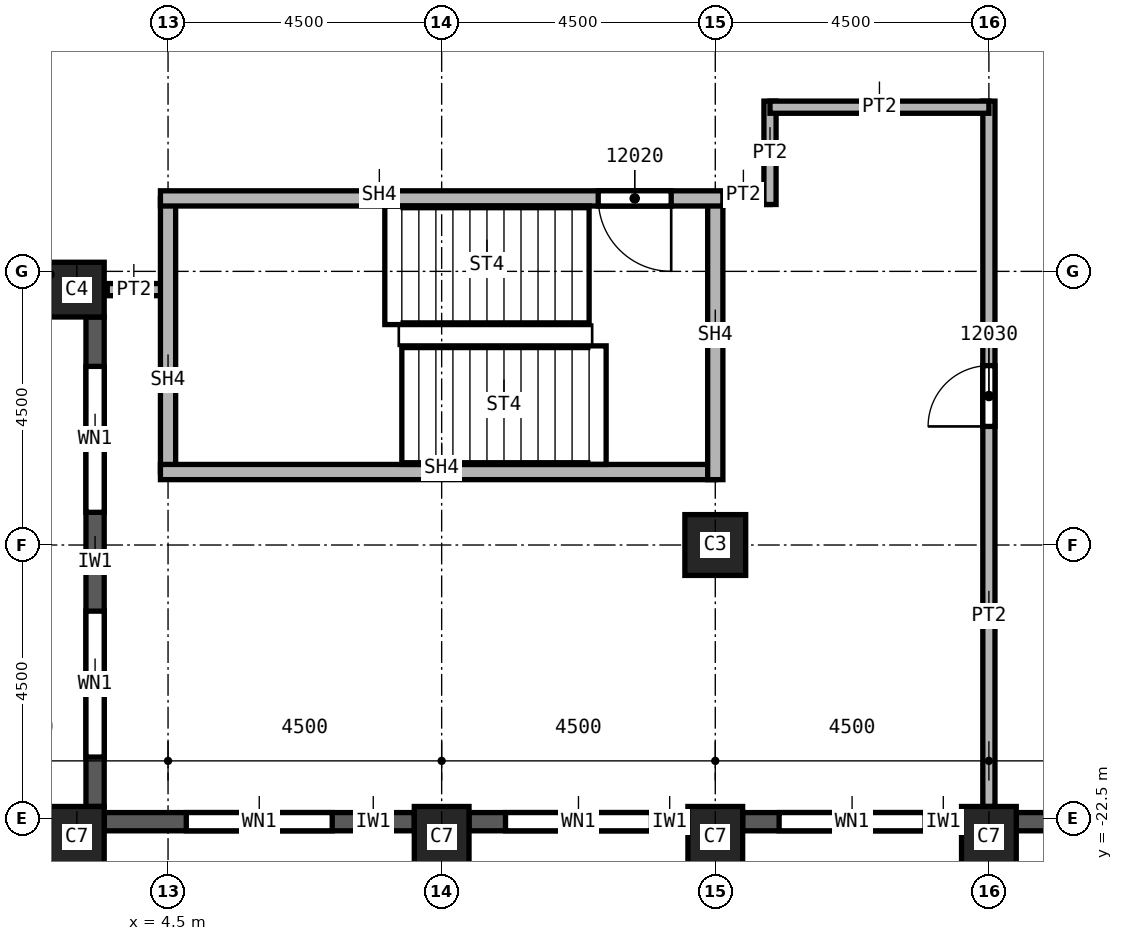
"""IFC4 building model, lengths in metres.
Left out: names, types, materials, properties, quantities, classifications, styles, units other than length and angle.
Written with IfcOpenShell. Run it as: python <this file> out.ifc"""

import sys

from ifc_helpers import new_model, si_unit, direction, frame, frame_2d, origin, origin_2d, place, context, subcontext, project, spatial, rectangle, extrude, element, fill, save


model = new_model("IFC4")
c1 = context("Model", 3, precision=1e-05, world=origin(), true_north=direction((0.0, 1.0)))
c2 = subcontext(c1, "Body", "Model", "MODEL_VIEW")
j1 = project(units=[si_unit("LENGTHUNIT", "METRE"), si_unit("PLANEANGLEUNIT", "RADIAN")], contexts=[c1])
p1 = place(None, origin())
s1 = spatial("IfcSite", under=j1, at=p1, CompositionType="ELEMENT")
p2 = place(p1, origin())
s2 = spatial("IfcBuilding", under=s1, at=p2, CompositionType="ELEMENT")
p3 = place(p2, frame((0.0, 0.0, 196.0)))
s3 = spatial("IfcBuildingStorey", under=s2, at=p3, CompositionType="ELEMENT", Elevation=196.0)
p4 = place(p3, frame((13.5, -18.0, 0.0), z_axis=(0.0, 0.0, 1.0), x_axis=(1.0, 0.0, 0.0)))
e1 = element("IfcColumn", 1, at=p4, inside=s3, PredefinedType="COLUMN", context=c2, shape_type="SweptSolid", body=[
    extrude(rectangle(XDim=1.0, YDim=1.0, at=origin_2d()), origin(), (0.0, 0.0, 1.0), 3.72),
])
for number, where, z_axis, x_axis in (
    (2, (3.0, -22.8, 0.0), (0.0, 0.0, 1.0), (1.0, 0.0, 0.0)),
    (3, (9.0, -22.8, 0.0), (0.0, 0.0, 1.0), (1.0, 0.0, 0.0)),
    (4, (13.5, -22.8, 0.0), (0.0, 0.0, 1.0), (1.0, 0.0, 0.0)),
    (5, (18.0, -22.8, 0.0), (0.0, 0.0, 1.0), (1.0, 0.0, 0.0)),
):
    element("IfcColumn", number, at=place(p3, frame(where, z_axis=z_axis, x_axis=x_axis)), inside=s3, PredefinedType="COLUMN", context=c2, shape_type="SweptSolid", body=[
        extrude(rectangle(XDim=0.9, YDim=1.0, at=origin_2d()), origin(), (0.0, 0.0, 1.0), 3.72),
    ])
p5 = place(p3, frame((3.0, -13.8, 0.0), z_axis=(0.0, 0.0, 1.0), x_axis=(1.0, 0.0, 0.0)))
e6 = element("IfcColumn", 6, at=p5, inside=s3, PredefinedType="COLUMN", context=c2, shape_type="SweptSolid", body=[
    extrude(rectangle(XDim=0.9, YDim=0.9, at=origin_2d()), origin(), (0.0, 0.0, 1.0), 3.72),
])
p6 = place(p3, frame((3.3, -14.25, 0.0), z_axis=(0.0, 0.0, 1.0), x_axis=(0.0, -1.0, 0.0)))
e7 = element("IfcWall", 7, at=p6, inside=s3, PredefinedType="SOLIDWALL", context=c2, shape_type="SweptSolid", body=[
    extrude(rectangle(XDim=8.05, YDim=0.3, at=frame_2d((4.025, 0.0))), origin(), (0.0, 0.0, 1.0), 3.12),
])
p7 = place(p6, frame((0.812, 0.0, 0.8)))
e8 = element("IfcOpeningElement", 8, at=p7, cuts=e7, PredefinedType="OPENING", context=c2, shape_type="SweptSolid", body=[
    extrude(rectangle(XDim=2.4, YDim=1.95, at=frame_2d((1.2, 0.975))), frame((0.0, 0.15, 0.0), z_axis=(0.0, -1.0, 0.0), x_axis=(1.0, 0.0, 0.0)), (0.0, 0.0, 1.0), 0.3),
])
p8 = place(p6, frame((4.837, 0.0, 0.8)))
e9 = element("IfcOpeningElement", 9, at=p8, cuts=e7, PredefinedType="OPENING", context=c2, shape_type="SweptSolid", body=[
    extrude(rectangle(XDim=2.4, YDim=1.95, at=frame_2d((1.2, 0.975))), frame((0.0, 0.15, 0.0), z_axis=(0.0, -1.0, 0.0), x_axis=(1.0, 0.0, 0.0)), (0.0, 0.0, 1.0), 0.3),
])
p9 = place(p3, frame((3.45, -22.55, 0.0), z_axis=(0.0, 0.0, 1.0), x_axis=(1.0, 0.0, 0.0)))
e10 = element("IfcWall", 10, at=p9, inside=s3, PredefinedType="SOLIDWALL", context=c2, shape_type="SweptSolid", body=[
    extrude(rectangle(XDim=5.1, YDim=0.3, at=frame_2d((2.55, 0.0))), origin(), (0.0, 0.0, 1.0), 3.12),
])
p10 = place(p9, frame((1.35, 0.0, 0.8)))
e11 = element("IfcOpeningElement", 11, at=p10, cuts=e10, PredefinedType="OPENING", context=c2, shape_type="SweptSolid", body=[
    extrude(rectangle(XDim=2.4, YDim=1.95, at=frame_2d((1.2, 0.975))), frame((0.0, 0.15, 0.0), z_axis=(0.0, -1.0, 0.0), x_axis=(1.0, 0.0, 0.0)), (0.0, 0.0, 1.0), 0.3),
])
p11 = place(p3, frame((9.45, -22.55, 0.0), z_axis=(0.0, 0.0, 1.0), x_axis=(1.0, 0.0, 0.0)))
e12 = element("IfcWall", 12, at=p11, inside=s3, PredefinedType="SOLIDWALL", context=c2, shape_type="SweptSolid", body=[
    extrude(rectangle(XDim=3.6, YDim=0.3, at=frame_2d((1.8, 0.0))), origin(), (0.0, 0.0, 1.0), 3.12),
])
p12 = place(p11, frame((0.6, 0.0, 0.8)))
e13 = element("IfcOpeningElement", 13, at=p12, cuts=e12, PredefinedType="OPENING", context=c2, shape_type="SweptSolid", body=[
    extrude(rectangle(XDim=2.4, YDim=1.95, at=frame_2d((1.2, 0.975))), frame((0.0, 0.15, 0.0), z_axis=(0.0, -1.0, 0.0), x_axis=(1.0, 0.0, 0.0)), (0.0, 0.0, 1.0), 0.3),
])
p13 = place(p3, frame((13.95, -22.55, 0.0), z_axis=(0.0, 0.0, 1.0), x_axis=(1.0, 0.0, 0.0)))
e14 = element("IfcWall", 14, at=p13, inside=s3, PredefinedType="SOLIDWALL", context=c2, shape_type="SweptSolid", body=[
    extrude(rectangle(XDim=3.6, YDim=0.3, at=frame_2d((1.8, 0.0))), origin(), (0.0, 0.0, 1.0), 3.12),
])
p14 = place(p13, frame((0.6, 0.0, 0.8)))
e15 = element("IfcOpeningElement", 15, at=p14, cuts=e14, PredefinedType="OPENING", context=c2, shape_type="SweptSolid", body=[
    extrude(rectangle(XDim=2.4, YDim=1.95, at=frame_2d((1.2, 0.975))), frame((0.0, 0.15, 0.0), z_axis=(0.0, -1.0, 0.0), x_axis=(1.0, 0.0, 0.0)), (0.0, 0.0, 1.0), 0.3),
])
p15 = place(p3, frame((18.45, -22.55, 0.0), z_axis=(0.0, 0.0, 1.0), x_axis=(1.0, 0.0, 0.0)))
e16 = element("IfcWall", 16, at=p15, inside=s3, PredefinedType="SOLIDWALL", context=c2, shape_type="SweptSolid", body=[
    extrude(rectangle(XDim=3.6, YDim=0.3, at=frame_2d((1.8, 0.0))), origin(), (0.0, 0.0, 1.0), 3.12),
])
p16 = place(p15, frame((0.625, 0.0, 0.8)))
e17 = element("IfcOpeningElement", 17, at=p16, cuts=e16, PredefinedType="OPENING", context=c2, shape_type="SweptSolid", body=[
    extrude(rectangle(XDim=0.6, YDim=1.95, at=frame_2d((0.3, 0.975))), frame((0.0, 0.15, 0.0), z_axis=(0.0, -1.0, 0.0), x_axis=(1.0, 0.0, 0.0)), (0.0, 0.0, 1.0), 0.3),
])
p17 = place(p15, frame((1.825, 0.0, 0.8)))
e18 = element("IfcOpeningElement", 18, at=p17, cuts=e16, PredefinedType="OPENING", context=c2, shape_type="SweptSolid", body=[
    extrude(rectangle(XDim=1.0, YDim=1.95, at=frame_2d((0.5, 0.975))), frame((0.0, 0.15, 0.0), z_axis=(0.0, -1.0, 0.0), x_axis=(1.0, 0.0, 0.0)), (0.0, 0.0, 1.0), 0.3),
])
p18 = place(p3, frame((4.5, -13.8, 0.0), z_axis=(0.0, 0.0, 1.0), x_axis=(-1.0, 0.0, 0.0)))
e19 = element("IfcWall", 19, at=p18, inside=s3, PredefinedType="PARTITIONING", context=c2, shape_type="SweptSolid", body=[
    extrude(rectangle(XDim=1.0, YDim=0.2, at=frame_2d((0.5, 0.0))), origin(), (0.0, 0.0, 1.0), 3.72),
])
p19 = place(p3, frame((14.4, -12.3, 0.0), z_axis=(0.0, 0.0, 1.0), x_axis=(-1.0, 0.0, 0.0)))
e20 = element("IfcWall", 20, at=p19, inside=s3, PredefinedType="PARTITIONING", context=c2, shape_type="SweptSolid", body=[
    extrude(rectangle(XDim=1.025, YDim=0.2, at=frame_2d((0.512, 0.0))), origin(), (0.0, 0.0, 1.0), 3.72),
])
p20 = place(p3, frame((14.4, -10.7, 0.0), z_axis=(0.0, 0.0, 1.0), x_axis=(0.0, -1.0, 0.0)))
e21 = element("IfcWall", 21, at=p20, inside=s3, PredefinedType="PARTITIONING", context=c2, shape_type="SweptSolid", body=[
    extrude(rectangle(XDim=1.7, YDim=0.2, at=frame_2d((0.85, 0.0))), origin(), (0.0, 0.0, 1.0), 3.72),
])
p21 = place(p3, frame((18.0, -22.3, 0.0), z_axis=(0.0, 0.0, 1.0), x_axis=(0.0, 1.0, 0.0)))
e22 = element("IfcWall", 22, at=p21, inside=s3, PredefinedType="PARTITIONING", context=c2, shape_type="SweptSolid", body=[
    extrude(rectangle(XDim=11.6, YDim=0.2, at=frame_2d((5.8, 0.0))), origin(), (0.0, 0.0, 1.0), 3.72),
])
p22 = place(p21, frame((6.25, 0.0, 0.0)))
e23 = element("IfcOpeningElement", 23, at=p22, cuts=e22, PredefinedType="OPENING", context=c2, shape_type="SweptSolid", body=[
    extrude(rectangle(XDim=1.0, YDim=2.1, at=frame_2d((0.5, 1.05))), frame((0.0, 0.1, 0.0), z_axis=(0.0, -1.0, 0.0), x_axis=(1.0, 0.0, 0.0)), (0.0, 0.0, 1.0), 0.2),
])
p23 = place(p3, frame((18.0, -10.8, 0.0), z_axis=(0.0, 0.0, 1.0), x_axis=(-1.0, 0.0, 0.0)))
e24 = element("IfcWall", 24, at=p23, inside=s3, PredefinedType="PARTITIONING", context=c2, shape_type="SweptSolid", body=[
    extrude(rectangle(XDim=3.6, YDim=0.2, at=frame_2d((1.8, 0.0))), origin(), (0.0, 0.0, 1.0), 3.72),
])
p24 = place(p3, frame((4.5, -16.8, 0.0), z_axis=(0.0, 0.0, 1.0), x_axis=(0.0, 1.0, 0.0)))
e25 = element("IfcWall", 25, at=p24, inside=s3, PredefinedType="SOLIDWALL", context=c2, shape_type="SweptSolid", body=[
    extrude(rectangle(XDim=4.5, YDim=0.25, at=frame_2d((2.25, 0.0))), origin(), (0.0, 0.0, 1.0), 3.72),
])
p25 = place(p3, frame((13.5, -16.8, 0.0), z_axis=(0.0, 0.0, 1.0), x_axis=(-1.0, 0.0, 0.0)))
e26 = element("IfcWall", 26, at=p25, inside=s3, PredefinedType="SOLIDWALL", context=c2, shape_type="SweptSolid", body=[
    extrude(rectangle(XDim=9.125, YDim=0.25, at=frame_2d((4.562, 0.0))), origin(), (0.0, 0.0, 1.0), 3.72),
])
p26 = place(p3, frame((13.5, -12.3, 0.0), z_axis=(0.0, 0.0, 1.0), x_axis=(0.0, -1.0, 0.0)))
e27 = element("IfcWall", 27, at=p26, inside=s3, PredefinedType="SOLIDWALL", context=c2, shape_type="SweptSolid", body=[
    extrude(rectangle(XDim=4.625, YDim=0.25, at=frame_2d((2.312, 0.0))), origin(), (0.0, 0.0, 1.0), 3.72),
])
p27 = place(p3, frame((13.625, -12.3, 0.0), z_axis=(0.0, 0.0, 1.0), x_axis=(-1.0, 0.0, 0.0)))
e28 = element("IfcWall", 28, at=p27, inside=s3, PredefinedType="SOLIDWALL", context=c2, shape_type="SweptSolid", body=[
    extrude(rectangle(XDim=9.25, YDim=0.25, at=frame_2d((4.625, 0.0))), origin(), (0.0, 0.0, 1.0), 3.72),
])
p28 = place(p27, frame((0.85, 0.0, 0.0)))
e29 = element("IfcOpeningElement", 29, at=p28, cuts=e28, PredefinedType="OPENING", context=c2, shape_type="SweptSolid", body=[
    extrude(rectangle(XDim=1.2, YDim=2.1, at=frame_2d((0.6, 1.05))), frame((0.0, 0.125, 0.0), z_axis=(0.0, -1.0, 0.0), x_axis=(1.0, 0.0, 0.0)), (0.0, 0.0, 1.0), 0.25),
])
p29 = place(p7, origin())
e30 = element("IfcWindow", 30, at=p29, inside=s3, PartitioningType="SINGLE_PANEL", PredefinedType="WINDOW", context=c2, shape_type="SweptSolid", body=[
    extrude(rectangle(XDim=2.4, YDim=1.95, at=frame_2d((1.2, 0.975))), frame((0.0, 0.03, 0.0), z_axis=(0.0, -1.0, 0.0), x_axis=(1.0, 0.0, 0.0)), (0.0, 0.0, 1.0), 0.06),
])
fill(e8, e30)
p30 = place(p8, origin())
e31 = element("IfcWindow", 31, at=p30, inside=s3, PartitioningType="SINGLE_PANEL", PredefinedType="WINDOW", context=c2, shape_type="SweptSolid", body=[
    extrude(rectangle(XDim=2.4, YDim=1.95, at=frame_2d((1.2, 0.975))), frame((0.0, 0.03, 0.0), z_axis=(0.0, -1.0, 0.0), x_axis=(1.0, 0.0, 0.0)), (0.0, 0.0, 1.0), 0.06),
])
fill(e9, e31)
p31 = place(p10, origin())
e32 = element("IfcWindow", 32, at=p31, inside=s3, PartitioningType="SINGLE_PANEL", PredefinedType="WINDOW", context=c2, shape_type="SweptSolid", body=[
    extrude(rectangle(XDim=2.4, YDim=1.95, at=frame_2d((1.2, 0.975))), frame((0.0, 0.03, 0.0), z_axis=(0.0, -1.0, 0.0), x_axis=(1.0, 0.0, 0.0)), (0.0, 0.0, 1.0), 0.06),
])
fill(e11, e32)
p32 = place(p12, origin())
e33 = element("IfcWindow", 33, at=p32, inside=s3, PartitioningType="SINGLE_PANEL", PredefinedType="WINDOW", context=c2, shape_type="SweptSolid", body=[
    extrude(rectangle(XDim=2.4, YDim=1.95, at=frame_2d((1.2, 0.975))), frame((0.0, 0.03, 0.0), z_axis=(0.0, -1.0, 0.0), x_axis=(1.0, 0.0, 0.0)), (0.0, 0.0, 1.0), 0.06),
])
fill(e13, e33)
p33 = place(p14, origin())
e34 = element("IfcWindow", 34, at=p33, inside=s3, PartitioningType="SINGLE_PANEL", PredefinedType="WINDOW", context=c2, shape_type="SweptSolid", body=[
    extrude(rectangle(XDim=2.4, YDim=1.95, at=frame_2d((1.2, 0.975))), frame((0.0, 0.03, 0.0), z_axis=(0.0, -1.0, 0.0), x_axis=(1.0, 0.0, 0.0)), (0.0, 0.0, 1.0), 0.06),
])
fill(e15, e34)
p34 = place(p28, origin())
e35 = element("IfcDoor", 35, at=p34, inside=s3, OperationType="SINGLE_SWING_LEFT", PredefinedType="DOOR", context=c2, shape_type="SweptSolid", body=[
    extrude(rectangle(XDim=1.2, YDim=2.1, at=frame_2d((0.6, 1.05))), frame((0.0, 0.025, 0.0), z_axis=(0.0, -1.0, 0.0), x_axis=(1.0, 0.0, 0.0)), (0.0, 0.0, 1.0), 0.05),
])
fill(e29, e35)
p35 = place(p22, origin())
e36 = element("IfcDoor", 36, at=p35, inside=s3, OperationType="SINGLE_SWING_LEFT", PredefinedType="DOOR", context=c2, shape_type="SweptSolid", body=[
    extrude(rectangle(XDim=1.0, YDim=2.1, at=frame_2d((0.5, 1.05))), frame((0.0, 0.025, 0.0), z_axis=(0.0, -1.0, 0.0), x_axis=(1.0, 0.0, 0.0)), (0.0, 0.0, 1.0), 0.05),
])
fill(e23, e36)
save(model, sys.argv[1])
